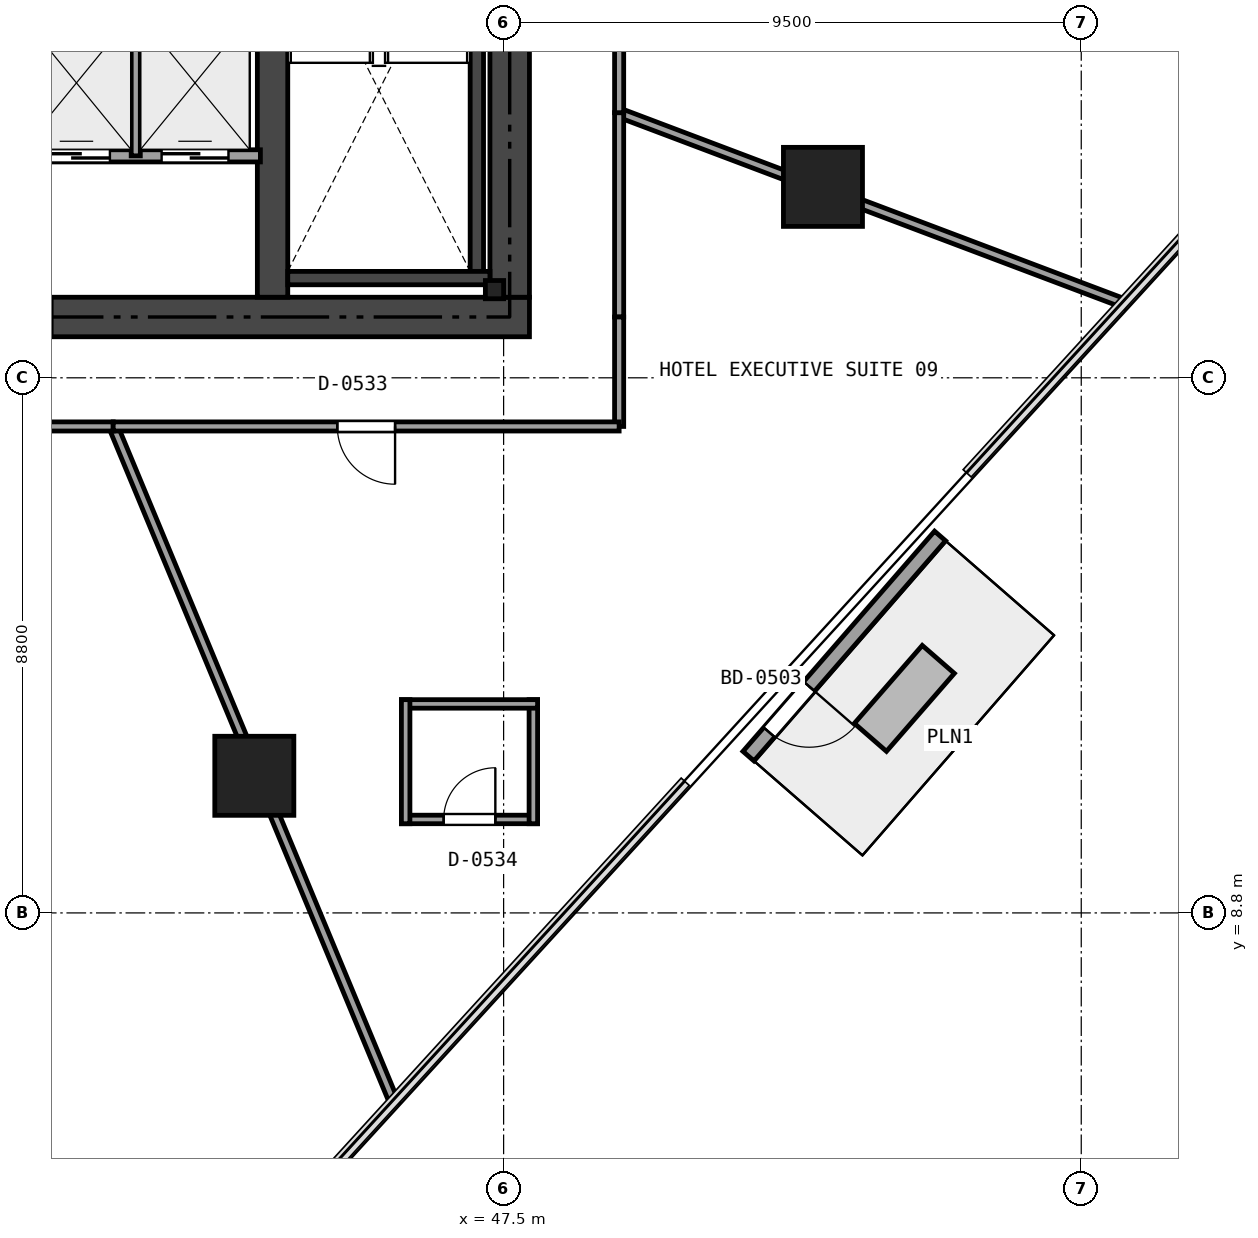
"""IFC4 building model, lengths in metres.
Left out: names, types, materials, properties, quantities, classifications, styles, units other than length and angle.
Written with IfcOpenShell. Run it as: python <this file> out.ifc"""

import sys

from ifc_helpers import new_model, si_unit, direction, frame, frame_2d, origin, origin_2d, place, context, subcontext, project, spatial, rectangle, i_section, extrude, element, fill, save


model = new_model("IFC4")
c1 = context("Model", 3, precision=1e-05, world=origin(), true_north=direction((0.0, 1.0)))
c2 = subcontext(c1, "Body", "Model", "MODEL_VIEW")
j1 = project(units=[si_unit("LENGTHUNIT", "METRE"), si_unit("PLANEANGLEUNIT", "RADIAN")], contexts=[c1])
p1 = place(None, origin())
s1 = spatial("IfcSite", under=j1, at=p1, CompositionType="ELEMENT")
p2 = place(p1, origin())
s2 = spatial("IfcBuilding", under=s1, at=p2, CompositionType="ELEMENT")
p3 = place(p2, frame((0.0, 0.0, 27.0)))
s3 = spatial("IfcBuildingStorey", under=s2, at=p3, CompositionType="ELEMENT", Elevation=27.0)
p4 = place(p3, frame((26.475, 18.6, 0.0), z_axis=(0.0, 0.0, 1.0), x_axis=(1.0, 0.0, 0.0)))
e1 = element("IfcWall", 1, at=p4, inside=s3, PredefinedType="SHEAR", context=c2, shape_type="SweptSolid", body=[
    extrude(rectangle(XDim=21.45, YDim=0.65, at=frame_2d((10.725, 0.0))), origin(), (0.0, 0.0, 1.0), 3.17),
])
p5 = place(p4, frame((12.45, 0.0, 0.0)))
e2 = element("IfcOpeningElement", 2, at=p5, cuts=e1, PredefinedType="OPENING", context=c2, shape_type="SweptSolid", body=[
    extrude(rectangle(XDim=1.15, YDim=2.15, at=frame_2d((0.575, 1.075))), frame((0.0, 0.335, 0.0), z_axis=(0.0, -1.0, 0.0), x_axis=(1.0, 0.0, 0.0)), (0.0, 0.0, 1.0), 0.67),
])
p6 = place(p4, frame((5.275, 0.0, 0.0)))
e3 = element("IfcOpeningElement", 3, at=p6, cuts=e1, PredefinedType="OPENING", context=c2, shape_type="SweptSolid", body=[
    extrude(rectangle(XDim=0.9, YDim=2.1, at=frame_2d((0.45, 1.05))), frame((0.0, 0.335, 0.0), z_axis=(0.0, -1.0, 0.0), x_axis=(1.0, 0.0, 0.0)), (0.0, 0.0, 1.0), 0.67),
])
p7 = place(p3, frame((47.6, 18.925, 0.0), z_axis=(0.0, 0.0, 1.0), x_axis=(0.0, 1.0, 0.0)))
e4 = element("IfcWall", 4, at=p7, inside=s3, PredefinedType="SHEAR", context=c2, shape_type="SweptSolid", body=[
    extrude(rectangle(XDim=14.95, YDim=0.65, at=frame_2d((7.475, 0.0))), origin(), (0.0, 0.0, 1.0), 3.17),
])
p8 = place(p7, frame((6.575, 0.0, 0.0)))
e5 = element("IfcOpeningElement", 5, at=p8, cuts=e4, PredefinedType="OPENING", context=c2, shape_type="SweptSolid", body=[
    extrude(rectangle(XDim=1.1, YDim=2.15, at=frame_2d((0.55, 1.075))), frame((0.0, 0.335, 0.0), z_axis=(0.0, -1.0, 0.0), x_axis=(1.0, 0.0, 0.0)), (0.0, 0.0, 1.0), 0.67),
])
p9 = place(p7, frame((8.475, 0.0, 0.0)))
e6 = element("IfcOpeningElement", 6, at=p9, cuts=e4, PredefinedType="OPENING", context=c2, shape_type="SweptSolid", body=[
    extrude(rectangle(XDim=0.9, YDim=2.1, at=frame_2d((0.45, 1.05))), frame((0.0, 0.335, 0.0), z_axis=(0.0, -1.0, 0.0), x_axis=(1.0, 0.0, 0.0)), (0.0, 0.0, 1.0), 0.67),
])
p10 = place(p7, frame((13.125, 0.0, 0.0)))
e7 = element("IfcOpeningElement", 7, at=p10, cuts=e4, PredefinedType="OPENING", context=c2, shape_type="SweptSolid", body=[
    extrude(rectangle(XDim=0.9, YDim=2.1, at=frame_2d((0.45, 1.05))), frame((0.0, 0.335, 0.0), z_axis=(0.0, -1.0, 0.0), x_axis=(1.0, 0.0, 0.0)), (0.0, 0.0, 1.0), 0.67),
])
p11 = place(p3, frame((43.7, 18.925, 0.0), z_axis=(0.0, 0.0, 1.0), x_axis=(0.0, 1.0, 0.0)))
e8 = element("IfcWall", 8, at=p11, inside=s3, PredefinedType="SHEAR", context=c2, shape_type="SweptSolid", body=[
    extrude(rectangle(XDim=14.95, YDim=0.5, at=frame_2d((7.475, 0.0))), origin(), (0.0, 0.0, 1.0), 3.17),
])
p12 = place(p11, frame((8.075, 0.0, 0.0)))
e9 = element("IfcOpeningElement", 9, at=p12, cuts=e8, PredefinedType="OPENING", context=c2, shape_type="SweptSolid", body=[
    extrude(rectangle(XDim=0.9, YDim=2.1, at=frame_2d((0.45, 1.05))), frame((0.0, 0.26, 0.0), z_axis=(0.0, -1.0, 0.0), x_axis=(1.0, 0.0, 0.0)), (0.0, 0.0, 1.0), 0.52),
])
p13 = place(p3, frame((47.06, 19.35, 0.0), z_axis=(0.0, 0.0, 1.0), x_axis=(0.0, 1.0, 0.0)))
e10 = element("IfcWall", 10, at=p13, inside=s3, PredefinedType="SHEAR", context=c2, shape_type="SweptSolid", body=[
    extrude(rectangle(XDim=5.9, YDim=0.22, at=frame_2d((2.95, 0.0))), origin(), (0.0, 0.0, 1.0), 3.17),
])
p14 = place(p3, frame((43.95, 19.24, 0.0), z_axis=(0.0, 0.0, 1.0), x_axis=(1.0, 0.0, 0.0)))
e11 = element("IfcWall", 11, at=p14, inside=s3, PredefinedType="SHEAR", context=c2, shape_type="SweptSolid", body=[
    extrude(rectangle(XDim=3.325, YDim=0.22, at=frame_2d((1.663, 0.0))), origin(), (0.0, 0.0, 1.0), 3.17),
])
for number, where, z_axis, x_axis in (
    (12, (43.4, 11.055, -0.405), (0.0, 0.0, 1.0), (1.0, 0.0, 0.0)),
    (13, (52.752, 20.74, -0.405), (0.0, 0.0, 1.0), (1.0, 0.0, 0.0)),
):
    element("IfcColumn", number, at=place(p3, frame(where, z_axis=z_axis, x_axis=x_axis)), inside=s3, PredefinedType="COLUMN", context=c2, shape_type="SweptSolid", body=[
        extrude(rectangle(XDim=1.3, YDim=1.3, at=origin_2d()), origin(), (0.0, 0.0, 1.0), 3.575),
    ])
p15 = place(p3, frame((47.35, 19.05, 0.0), z_axis=(0.0, 0.0, 1.0), x_axis=(1.0, 0.0, 0.0)))
e14 = element("IfcColumn", 14, at=p15, inside=s3, PredefinedType="PILASTER", context=c2, shape_type="SweptSolid", body=[
    extrude(i_section(OverallWidth=0.3, OverallDepth=0.3, WebThickness=0.011, FlangeThickness=0.019, at=origin_2d()), origin(), (0.0, 0.0, 1.0), 3.17),
])
p16 = place(p3, frame((54.678, 14.999, 0.0), z_axis=(0.0, 0.0, 1.0), x_axis=(-0.656428008084, -0.754388673167, 0.0)))
e15 = element("IfcWall", 15, at=p16, inside=s3, PredefinedType="SOLIDWALL", context=c2, shape_type="SweptSolid", body=[
    extrude(rectangle(XDim=4.8, YDim=0.24, at=frame_2d((2.4, 0.0))), origin(), (0.0, 0.0, 1.0), 3.17),
])
p17 = place(p16, frame((3.28, 0.0, 0.0)))
e16 = element("IfcOpeningElement", 16, at=p17, cuts=e15, PredefinedType="OPENING", context=c2, shape_type="SweptSolid", body=[
    extrude(rectangle(XDim=1.0, YDim=2.15, at=frame_2d((0.5, 1.075))), frame((0.0, 0.13, 0.0), z_axis=(0.0, -1.0, 0.0), x_axis=(1.0, 0.0, 0.0)), (0.0, 0.0, 1.0), 0.26),
])
p18 = place(p3, frame((35.62, 21.25, 0.0), z_axis=(0.0, 0.0, 1.0), x_axis=(1.0, 0.0, 0.0)))
e17 = element("IfcWall", 17, at=p18, inside=s3, PredefinedType="SOLIDWALL", context=c2, shape_type="SweptSolid", body=[
    extrude(rectangle(XDim=7.88, YDim=0.2, at=frame_2d((3.94, 0.0))), origin(), (0.0, 0.0, 1.0), 3.17),
])
p19 = place(p18, frame((0.405, 0.0, 0.0)))
e18 = element("IfcOpeningElement", 18, at=p19, cuts=e17, PredefinedType="OPENING", context=c2, shape_type="SweptSolid", body=[
    extrude(rectangle(XDim=1.1, YDim=2.15, at=frame_2d((0.55, 1.075))), frame((0.0, 0.11, 0.0), z_axis=(0.0, -1.0, 0.0), x_axis=(1.0, 0.0, 0.0)), (0.0, 0.0, 1.0), 0.22),
])
p20 = place(p18, frame((2.355, 0.0, 0.0)))
e19 = element("IfcOpeningElement", 19, at=p20, cuts=e17, PredefinedType="OPENING", context=c2, shape_type="SweptSolid", body=[
    extrude(rectangle(XDim=1.1, YDim=2.15, at=frame_2d((0.55, 1.075))), frame((0.0, 0.11, 0.0), z_axis=(0.0, -1.0, 0.0), x_axis=(1.0, 0.0, 0.0)), (0.0, 0.0, 1.0), 0.22),
])
p21 = place(p18, frame((4.305, 0.0, 0.0)))
e20 = element("IfcOpeningElement", 20, at=p21, cuts=e17, PredefinedType="OPENING", context=c2, shape_type="SweptSolid", body=[
    extrude(rectangle(XDim=1.1, YDim=2.15, at=frame_2d((0.55, 1.075))), frame((0.0, 0.11, 0.0), z_axis=(0.0, -1.0, 0.0), x_axis=(1.0, 0.0, 0.0)), (0.0, 0.0, 1.0), 0.22),
])
p22 = place(p18, frame((6.255, 0.0, 0.0)))
e21 = element("IfcOpeningElement", 21, at=p22, cuts=e17, PredefinedType="OPENING", context=c2, shape_type="SweptSolid", body=[
    extrude(rectangle(XDim=1.1, YDim=2.15, at=frame_2d((0.55, 1.075))), frame((0.0, 0.11, 0.0), z_axis=(0.0, -1.0, 0.0), x_axis=(1.0, 0.0, 0.0)), (0.0, 0.0, 1.0), 0.22),
])
p23 = place(p3, frame((41.45, 21.25, 0.0), z_axis=(0.0, 0.0, 1.0), x_axis=(0.0, 1.0, 0.0)))
e22 = element("IfcWall", 22, at=p23, inside=s3, PredefinedType="PARTITIONING", context=c2, shape_type="SweptSolid", body=[
    extrude(rectangle(XDim=2.4, YDim=0.15, at=frame_2d((1.2, 0.0))), origin(), (0.0, 0.0, 1.0), 2.691),
])
p24 = place(p3, frame((45.819, 10.337, 0.0), z_axis=(0.0, 0.0, 1.0), x_axis=(1.0, 0.0, 0.0)))
e23 = element("IfcWall", 23, at=p24, inside=s3, PredefinedType="PARTITIONING", context=c2, shape_type="SweptSolid", body=[
    extrude(rectangle(XDim=2.24, YDim=0.14, at=frame_2d((1.12, 0.0))), origin(), (0.0, 0.0, 1.0), 3.17),
])
p25 = place(p24, frame((0.695, 0.0, 0.0)))
e24 = element("IfcOpeningElement", 24, at=p25, cuts=e23, PredefinedType="OPENING", context=c2, shape_type="SweptSolid", body=[
    extrude(rectangle(XDim=0.85, YDim=2.1, at=frame_2d((0.425, 1.05))), frame((0.0, 0.08, 0.0), z_axis=(0.0, -1.0, 0.0), x_axis=(1.0, 0.0, 0.0)), (0.0, 0.0, 1.0), 0.16),
])
p26 = place(p3, frame((47.989, 10.267, 0.0), z_axis=(0.0, 0.0, 1.0), x_axis=(0.0, 1.0, 0.0)))
e25 = element("IfcWall", 25, at=p26, inside=s3, PredefinedType="PARTITIONING", context=c2, shape_type="SweptSolid", body=[
    extrude(rectangle(XDim=2.04, YDim=0.14, at=frame_2d((1.02, 0.0))), origin(), (0.0, 0.0, 1.0), 3.17),
])
p27 = place(p3, frame((48.059, 12.237, 0.0), z_axis=(0.0, 0.0, 1.0), x_axis=(-1.0, 0.0, 0.0)))
e26 = element("IfcWall", 26, at=p27, inside=s3, PredefinedType="PARTITIONING", context=c2, shape_type="SweptSolid", body=[
    extrude(rectangle(XDim=2.24, YDim=0.14, at=frame_2d((1.12, 0.0))), origin(), (0.0, 0.0, 1.0), 3.17),
])
p28 = place(p3, frame((45.889, 12.307, 0.0), z_axis=(0.0, 0.0, 1.0), x_axis=(0.0, -1.0, 0.0)))
e27 = element("IfcWall", 27, at=p28, inside=s3, PredefinedType="PARTITIONING", context=c2, shape_type="SweptSolid", body=[
    extrude(rectangle(XDim=2.04, YDim=0.14, at=frame_2d((1.02, 0.0))), origin(), (0.0, 0.0, 1.0), 3.17),
])
p29 = place(p3, frame((45.709, 5.659, 0.0), z_axis=(0.0, 0.0, 1.0), x_axis=(-0.383750228446, 0.923436929177, 0.0)))
e28 = element("IfcWall", 28, at=p29, inside=s3, PredefinedType="PARTITIONING", context=c2, shape_type="SweptSolid", body=[
    extrude(rectangle(XDim=12.065, YDim=0.15, at=frame_2d((6.032, 0.0))), origin(), (0.0, 0.0, 1.0), 2.395),
])
p30 = place(p3, frame((41.079, 16.8, 0.0), z_axis=(0.0, 0.0, 1.0), x_axis=(-1.0, 0.0, 0.0)))
e29 = element("IfcWall", 29, at=p30, inside=s3, PredefinedType="PARTITIONING", context=c2, shape_type="SweptSolid", body=[
    extrude(rectangle(XDim=6.998, YDim=0.15, at=frame_2d((3.499, 0.0))), origin(), (0.0, 0.0, 1.0), 2.395),
])
p31 = place(p30, frame((3.024, 0.0, 0.0)))
e30 = element("IfcOpeningElement", 30, at=p31, cuts=e29, PredefinedType="OPENING", context=c2, shape_type="SweptSolid", body=[
    extrude(rectangle(XDim=0.95, YDim=2.15, at=frame_2d((0.475, 1.075))), frame((0.0, 0.085, 0.0), z_axis=(0.0, -1.0, 0.0), x_axis=(1.0, 0.0, 0.0)), (0.0, 0.0, 1.0), 0.17),
])
p32 = place(p3, frame((57.732, 18.814, 0.0), z_axis=(0.0, 0.0, 1.0), x_axis=(-0.935533704254, 0.353237438848, 0.0)))
e31 = element("IfcWall", 31, at=p32, inside=s3, PredefinedType="PARTITIONING", context=c2, shape_type="SweptSolid", body=[
    extrude(rectangle(XDim=8.906, YDim=0.15, at=frame_2d((4.453, 0.0))), origin(), (0.0, 0.0, 1.0), 2.395),
])
p33 = place(p3, frame((49.4, 21.96, 0.0), z_axis=(0.0, 0.0, 1.0), x_axis=(0.0, -1.0, 0.0)))
e32 = element("IfcWall", 32, at=p33, inside=s3, PredefinedType="PARTITIONING", context=c2, shape_type="SweptSolid", body=[
    extrude(rectangle(XDim=3.36, YDim=0.15, at=frame_2d((1.68, 0.0))), origin(), (0.0, 0.0, 1.0), 2.395),
])
p34 = place(p3, frame((49.4, 18.6, 0.0), z_axis=(0.0, 0.0, 1.0), x_axis=(0.0, -1.0, 0.0)))
e33 = element("IfcWall", 33, at=p34, inside=s3, PredefinedType="PARTITIONING", context=c2, shape_type="SweptSolid", body=[
    extrude(rectangle(XDim=1.8, YDim=0.15, at=frame_2d((0.9, 0.0))), origin(), (0.0, 0.0, 1.0), 2.355),
])
p35 = place(p3, frame((49.4, 16.8, 0.0), z_axis=(0.0, 0.0, 1.0), x_axis=(-1.0, 0.0, 0.0)))
e34 = element("IfcWall", 34, at=p35, inside=s3, PredefinedType="PARTITIONING", context=c2, shape_type="SweptSolid", body=[
    extrude(rectangle(XDim=8.321, YDim=0.15, at=frame_2d((4.16, 0.0))), origin(), (0.0, 0.0, 1.0), 2.355),
])
p36 = place(p35, frame((3.685, 0.0, 0.0)))
e35 = element("IfcOpeningElement", 35, at=p36, cuts=e34, PredefinedType="OPENING", context=c2, shape_type="SweptSolid", body=[
    extrude(rectangle(XDim=0.95, YDim=2.15, at=frame_2d((0.475, 1.075))), frame((0.0, 0.085, 0.0), z_axis=(0.0, -1.0, 0.0), x_axis=(1.0, 0.0, 0.0)), (0.0, 0.0, 1.0), 0.17),
])
p37 = place(p3, frame((49.4, 28.993, 0.0), z_axis=(0.0, 0.0, 1.0), x_axis=(0.0, -1.0, 0.0)))
e36 = element("IfcWall", 36, at=p37, inside=s3, PredefinedType="PARTITIONING", context=c2, shape_type="SweptSolid", body=[
    extrude(rectangle(XDim=7.033, YDim=0.15, at=frame_2d((3.517, 0.0))), origin(), (0.0, 0.0, 1.0), 2.395),
])
p38 = place(p37, frame((3.041, 0.0, 0.0)))
e37 = element("IfcOpeningElement", 37, at=p38, cuts=e36, PredefinedType="OPENING", context=c2, shape_type="SweptSolid", body=[
    extrude(rectangle(XDim=0.95, YDim=2.15, at=frame_2d((0.475, 1.075))), frame((0.0, 0.085, 0.0), z_axis=(0.0, -1.0, 0.0), x_axis=(1.0, 0.0, 0.0)), (0.0, 0.0, 1.0), 0.17),
])
p39 = place(p17, origin())
e38 = element("IfcDoor", 38, at=p39, inside=s3, OperationType="SINGLE_SWING_LEFT", PredefinedType="DOOR", context=c2, shape_type="SweptSolid", body=[
    extrude(rectangle(XDim=1.0, YDim=2.15, at=frame_2d((0.5, 1.075))), frame((0.0, 0.025, 0.0), z_axis=(0.0, -1.0, 0.0), x_axis=(1.0, 0.0, 0.0)), (0.0, 0.0, 1.0), 0.05),
])
fill(e16, e38)
p40 = place(p21, origin())
e39 = element("IfcDoor", 39, at=p40, inside=s3, OperationType="SLIDING_TO_LEFT", PredefinedType="DOOR", context=c2, shape_type="SweptSolid", body=[
    extrude(rectangle(XDim=1.1, YDim=2.15, at=frame_2d((0.55, 1.075))), frame((0.0, 0.025, 0.0), z_axis=(0.0, -1.0, 0.0), x_axis=(1.0, 0.0, 0.0)), (0.0, 0.0, 1.0), 0.05),
])
fill(e20, e39)
p41 = place(p22, origin())
e40 = element("IfcDoor", 40, at=p41, inside=s3, OperationType="SLIDING_TO_LEFT", PredefinedType="DOOR", context=c2, shape_type="SweptSolid", body=[
    extrude(rectangle(XDim=1.1, YDim=2.15, at=frame_2d((0.55, 1.075))), frame((0.0, 0.025, 0.0), z_axis=(0.0, -1.0, 0.0), x_axis=(1.0, 0.0, 0.0)), (0.0, 0.0, 1.0), 0.05),
])
fill(e21, e40)
p42 = place(p36, origin())
e41 = element("IfcDoor", 41, at=p42, inside=s3, OperationType="SINGLE_SWING_LEFT", PredefinedType="DOOR", context=c2, shape_type="SweptSolid", body=[
    extrude(rectangle(XDim=0.95, YDim=2.15, at=frame_2d((0.475, 1.075))), frame((0.0, 0.025, 0.0), z_axis=(0.0, -1.0, 0.0), x_axis=(1.0, 0.0, 0.0)), (0.0, 0.0, 1.0), 0.05),
])
fill(e35, e41)
p43 = place(p25, origin())
e42 = element("IfcDoor", 42, at=p43, inside=s3, OperationType="SINGLE_SWING_RIGHT", PredefinedType="DOOR", context=c2, shape_type="SweptSolid", body=[
    extrude(rectangle(XDim=0.85, YDim=2.1, at=frame_2d((0.425, 1.05))), frame((0.0, 0.025, 0.0), z_axis=(0.0, -1.0, 0.0), x_axis=(1.0, 0.0, 0.0)), (0.0, 0.0, 1.0), 0.05),
])
fill(e24, e42)
save(model, sys.argv[1])
